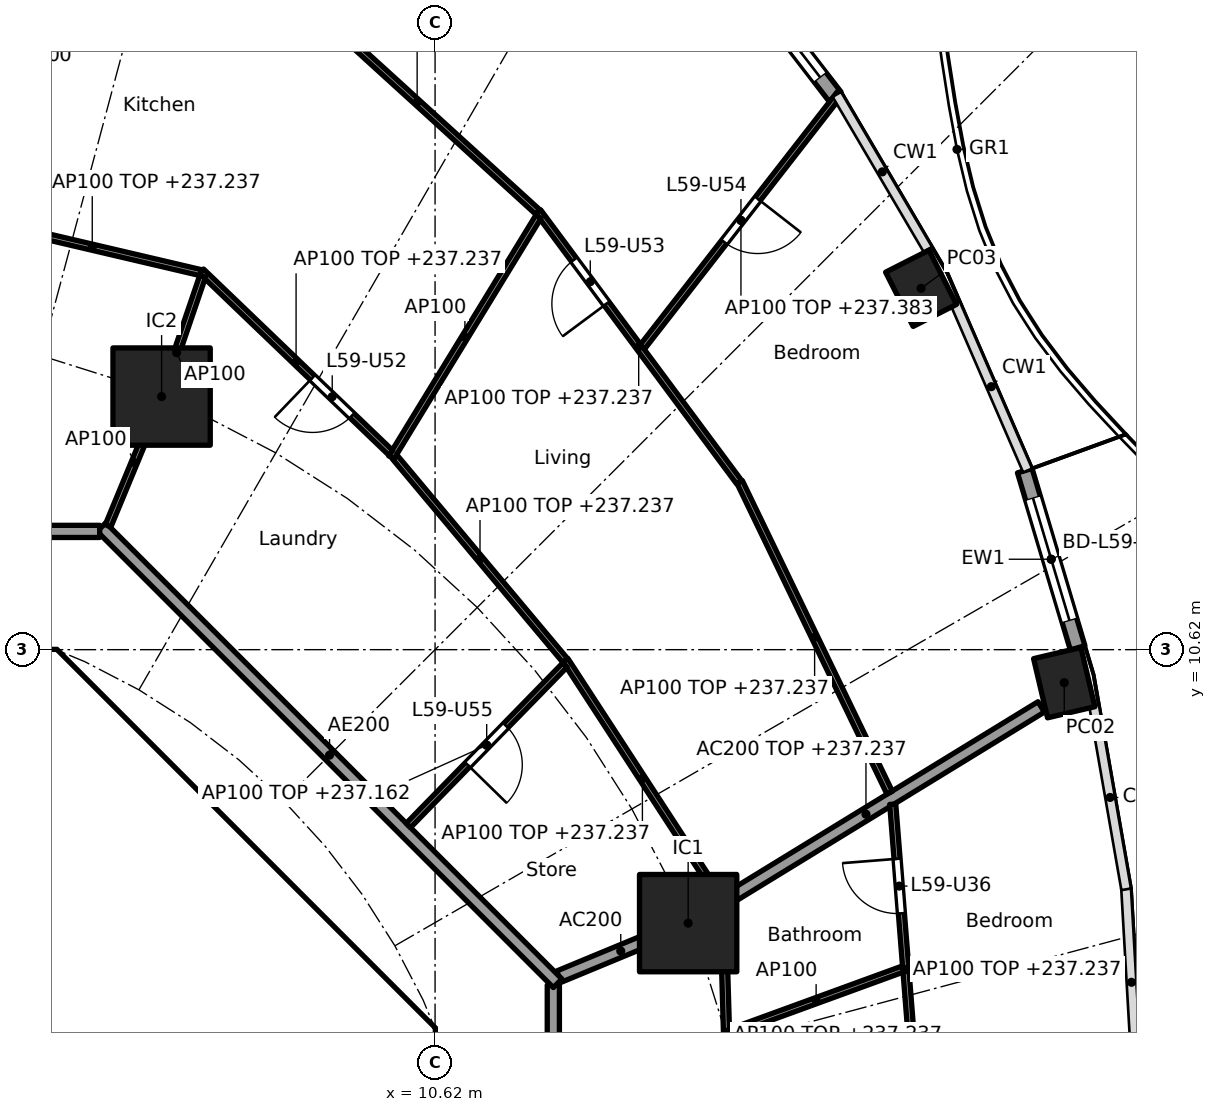
"""IFC4 building model, lengths in metres.
Left out: names, types, materials, properties, quantities, classifications, styles, units other than length and angle.
Written with IfcOpenShell. Run it as: python <this file> out.ifc"""

import sys

from ifc_helpers import new_model, si_unit, direction, frame, frame_2d, origin, origin_2d, place, context, subcontext, project, spatial, polyline, rectangle, hollow_rectangle, outline, extrude, element, fill, save


model = new_model("IFC4")
c1 = context("Model", 3, precision=1e-05, world=origin(), true_north=direction((0.0, 1.0)))
c2 = subcontext(c1, "Body", "Model", "MODEL_VIEW")
j1 = project(units=[si_unit("LENGTHUNIT", "METRE"), si_unit("PLANEANGLEUNIT", "RADIAN")], contexts=[c1])
p1 = place(None, origin())
s1 = spatial("IfcSite", under=j1, at=p1, CompositionType="ELEMENT")
p2 = place(p1, origin())
s2 = spatial("IfcBuilding", under=s1, at=p2, CompositionType="ELEMENT")
p3 = place(p2, frame((0.0, 0.0, 234.4)))
s3 = spatial("IfcBuildingStorey", under=s2, at=p3, CompositionType="ELEMENT", Elevation=234.4)
for number, where, z_axis, x_axis in (
    (1, (20.967, 10.077, 0.0), (0.0, 0.0, 1.0), (-0.229, 0.973, 0.0)),
    (2, (18.612, 16.563, 0.0), (0.0, 0.0, 1.0), (-0.452, 0.892, 0.0)),
):
    element("IfcColumn", number, at=place(p3, frame(where, z_axis=z_axis, x_axis=x_axis)), inside=s3, PredefinedType="COLUMN", context=c2, shape_type="SweptSolid", body=[
        extrude(hollow_rectangle(XDim=1.0, YDim=0.8, WallThickness=0.032, at=origin_2d()), origin(), (0.0, 0.0, 1.0), 3.7),
    ])
for number, where, z_axis, x_axis in (
    (3, (14.782, 6.123, 0.0), (0.0, 0.0, 1.0), (1.0, 0.0, 0.0)),
    (4, (6.123, 14.782, 0.0), (0.0, 0.0, 1.0), (1.0, 0.0, 0.0)),
):
    element("IfcColumn", number, at=place(p3, frame(where, z_axis=z_axis, x_axis=x_axis)), inside=s3, PredefinedType="COLUMN", context=c2, shape_type="SweptSolid", body=[
        extrude(rectangle(XDim=1.6, YDim=1.6, at=origin_2d()), origin(), (0.0, 0.0, 1.0), 3.7),
    ])
p4 = place(p3, frame((20.318, 13.564, 0.0), z_axis=(0.0, 0.0, 1.0), x_axis=(0.285785716255, -0.958293548128, 0.0)))
e5 = element("IfcWall", 5, at=p4, inside=s3, PredefinedType="SOLIDWALL", context=c2, shape_type="SweptSolid", body=[
    extrude(rectangle(XDim=3.04, YDim=0.25, at=frame_2d((1.52, 0.0))), origin(), (0.0, 0.0, 1.0), 3.44),
])
p5 = place(p4, frame((0.47, 0.0, 0.0)))
e6 = element("IfcOpeningElement", 6, at=p5, cuts=e5, PredefinedType="OPENING", context=c2, shape_type="SweptSolid", body=[
    extrude(rectangle(XDim=2.1, YDim=2.4, at=frame_2d((1.05, 1.2))), frame((0.0, 0.135, 0.0), z_axis=(0.0, -1.0, 0.0), x_axis=(1.0, 0.0, 0.0)), (0.0, 0.0, 1.0), 0.27),
])
p6 = place(p3, frame((15.426, 22.013, 0.0), z_axis=(0.0, 0.0, 1.0), x_axis=(0.610438565676, -0.792063607001, 0.0)))
e7 = element("IfcWall", 7, at=p6, inside=s3, PredefinedType="SOLIDWALL", context=c2, shape_type="SweptSolid", body=[
    extrude(rectangle(XDim=2.901, YDim=0.25, at=frame_2d((1.45, 0.0))), origin(), (0.0, 0.0, 1.0), 3.44),
])
p7 = place(p6, frame((0.4, 0.0, 0.0)))
e8 = element("IfcOpeningElement", 8, at=p7, cuts=e7, PredefinedType="OPENING", context=c2, shape_type="SweptSolid", body=[
    extrude(rectangle(XDim=2.1, YDim=2.4, at=frame_2d((1.05, 1.2))), frame((0.0, 0.135, 0.0), z_axis=(0.0, -1.0, 0.0), x_axis=(1.0, 0.0, 0.0)), (0.0, 0.0, 1.0), 0.27),
])
p8 = place(p3, frame((9.988, 4.613, 0.0), z_axis=(0.0, 0.0, 1.0), x_axis=(-0.707106781187, 0.707106781187, 0.0)))
e9 = element("IfcWall", 9, at=p8, inside=s3, PredefinedType="SHEAR", context=c2, shape_type="SweptSolid", body=[
    extrude(rectangle(XDim=7.602, YDim=0.6, at=frame_2d((3.801, 0.0))), origin(), (0.0, 0.0, 1.0), 3.44),
])
p9 = place(p8, frame((3.201, 0.0, 0.0)))
e10 = element("IfcOpeningElement", 10, at=p9, cuts=e9, PredefinedType="OPENING", context=c2, shape_type="SweptSolid", body=[
    extrude(rectangle(XDim=1.2, YDim=2.1, at=frame_2d((0.6, 1.05))), frame((0.0, 0.31, 0.0), z_axis=(0.0, -1.0, 0.0), x_axis=(1.0, 0.0, 0.0)), (0.0, 0.0, 1.0), 0.62),
])
p10 = place(p3, origin())
e11 = element("IfcWall", 11, at=p10, inside=s3, PredefinedType="SHEAR", context=c2, shape_type="SweptSolid", body=[
    extrude(outline(polyline([(-4.152, 10.025), (-4.401, 9.776), (-4.825, 10.2), (-4.401, 10.625), (4.401, 10.625), (4.825, 10.2), (4.401, 9.776), (4.152, 10.025), (-4.152, 10.025)])), origin(), (0.0, 0.0, 1.0), 3.44),
])
p11 = place(p3, origin())
e12 = element("IfcWall", 12, at=p11, inside=s3, PredefinedType="SHEAR", context=c2, shape_type="SweptSolid", body=[
    extrude(outline(polyline([(9.776, -4.401), (10.025, -4.152), (10.025, -3.801), (10.025, 4.152), (9.776, 4.401), (10.2, 4.825), (10.625, 4.401), (10.625, -4.401), (10.2, -4.825), (9.776, -4.401)])), origin(), (0.0, 0.0, 1.0), 3.44),
])
p12 = place(p3, frame((12.657, 5.243, 0.0), z_axis=(0.0, 0.0, 1.0), x_axis=(0.92383017907, 0.382802560388, 0.0)))
e13 = element("IfcWall", 13, at=p12, inside=s3, PredefinedType="PARTITIONING", context=c2, shape_type="SweptSolid", body=[
    extrude(rectangle(XDim=2.2, YDim=0.2, at=frame_2d((1.1, 0.0))), origin(), (0.0, 0.0, 1.0), 3.44),
])
p13 = place(p3, frame((14.825, 6.149, 0.0), z_axis=(0.0, 0.0, 1.0), x_axis=(0.852781365284, 0.522268075824, 0.0)))
e14 = element("IfcWall", 14, at=p13, inside=s3, PredefinedType="PARTITIONING", context=c2, shape_type="SweptSolid", body=[
    extrude(rectangle(XDim=6.758, YDim=0.2, at=frame_2d((3.379, 0.0))), origin(), (0.0, 0.0, 1.0), 2.837),
])
p14 = place(p3, frame((12.565, -5.104, 0.0), z_axis=(0.0, 0.0, 1.0), x_axis=(0.0, 1.0, 0.0)))
e15 = element("IfcWall", 15, at=p14, inside=s3, PredefinedType="PARTITIONING", context=c2, shape_type="SweptSolid", body=[
    extrude(rectangle(XDim=10.209, YDim=0.2, at=frame_2d((5.104, 0.0))), origin(), (0.0, 0.0, 1.0), 3.44),
])
p15 = place(p14, frame((4.604, 0.0, 0.0)))
e16 = element("IfcOpeningElement", 16, at=p15, cuts=e15, PredefinedType="OPENING", context=c2, shape_type="SweptSolid", body=[
    extrude(rectangle(XDim=1.0, YDim=2.1, at=frame_2d((0.5, 1.05))), frame((0.0, 0.11, 0.0), z_axis=(0.0, -1.0, 0.0), x_axis=(1.0, 0.0, 0.0)), (0.0, 0.0, 1.0), 0.22),
])
p16 = place(p3, frame((12.635, 5.134, 0.0), z_axis=(0.0, 0.0, 1.0), x_axis=(-0.707106781187, 0.707106781187, 0.0)))
e17 = element("IfcWall", 17, at=p16, inside=s3, PredefinedType="PARTITIONING", context=c2, shape_type="SweptSolid", body=[
    extrude(rectangle(XDim=10.609, YDim=0.2, at=frame_2d((5.305, 0.0))), origin(), (0.0, 0.0, 1.0), 3.44),
])
p17 = place(p3, frame((5.104, 12.565, 0.0), z_axis=(0.0, 0.0, 1.0), x_axis=(-1.0, 0.0, 0.0)))
e18 = element("IfcWall", 18, at=p17, inside=s3, PredefinedType="PARTITIONING", context=c2, shape_type="SweptSolid", body=[
    extrude(rectangle(XDim=10.409, YDim=0.2, at=frame_2d((5.205, 0.0))), origin(), (0.0, 0.0, 1.0), 3.44),
])
p18 = place(p3, frame((15.475, 2.2, 0.0), z_axis=(0.0, 0.0, 1.0), x_axis=(-0.029254623973, 0.999571991893, 0.0)))
e19 = element("IfcWall", 19, at=p18, inside=s3, PredefinedType="PARTITIONING", context=c2, shape_type="SweptSolid", body=[
    extrude(rectangle(XDim=4.173, YDim=0.1, at=frame_2d((2.086, 0.0))), origin(), (0.0, 0.0, 1.0), 2.837),
])
p19 = place(p3, frame((18.578, 2.642, 0.0), z_axis=(0.0, 0.0, 1.0), x_axis=(-0.079188322924, 0.996859673932, 0.0)))
e20 = element("IfcWall", 20, at=p19, inside=s3, PredefinedType="PARTITIONING", context=c2, shape_type="SweptSolid", body=[
    extrude(rectangle(XDim=5.454, YDim=0.1, at=frame_2d((2.727, 0.0))), origin(), (0.0, 0.0, 1.0), 2.837),
])
p20 = place(p19, frame((3.653, 0.0, 0.0)))
e21 = element("IfcOpeningElement", 21, at=p20, cuts=e20, PredefinedType="OPENING", context=c2, shape_type="SweptSolid", body=[
    extrude(rectangle(XDim=0.9, YDim=2.1, at=frame_2d((0.45, 1.05))), frame((0.0, 0.06, 0.0), z_axis=(0.0, -1.0, 0.0), x_axis=(1.0, 0.0, 0.0)), (0.0, 0.0, 1.0), 0.12),
])
p21 = place(p3, frame((15.46, 4.327, 0.0), z_axis=(0.0, 0.0, 1.0), x_axis=(0.939452643938, 0.342678755977, 0.0)))
e22 = element("IfcWall", 22, at=p21, inside=s3, PredefinedType="PARTITIONING", context=c2, shape_type="SweptSolid", body=[
    extrude(rectangle(XDim=3.037, YDim=0.1, at=frame_2d((1.519, 0.0))), origin(), (0.0, 0.0, 1.0), 3.44),
])
p22 = place(p3, frame((15.295, 6.554, 0.0), z_axis=(0.0, 0.0, 1.0), x_axis=(-0.545186120363, 0.838315032767, 0.0)))
e23 = element("IfcWall", 23, at=p22, inside=s3, PredefinedType="PARTITIONING", context=c2, shape_type="SweptSolid", body=[
    extrude(rectangle(XDim=4.643, YDim=0.1, at=frame_2d((2.321, 0.0))), origin(), (0.0, 0.0, 1.0), 2.837),
])
p23 = place(p3, frame((18.095, 8.269, 0.0), z_axis=(0.0, 0.0, 1.0), x_axis=(-0.434640773561, 0.900603907363, 0.0)))
e24 = element("IfcWall", 24, at=p23, inside=s3, PredefinedType="PARTITIONING", context=c2, shape_type="SweptSolid", body=[
    extrude(rectangle(XDim=5.674, YDim=0.1, at=frame_2d((2.837, 0.0))), origin(), (0.0, 0.0, 1.0), 2.837),
])
p24 = place(p3, frame((10.181, 7.729, 0.0), z_axis=(0.0, 0.0, 1.0), x_axis=(0.69841402561, 0.71569396311, 0.0)))
e25 = element("IfcWall", 25, at=p24, inside=s3, PredefinedType="PARTITIONING", context=c2, shape_type="SweptSolid", body=[
    extrude(rectangle(XDim=3.688, YDim=0.1, at=frame_2d((1.844, 0.0))), origin(), (0.0, 0.0, 1.0), 2.762),
])
p25 = place(p24, frame((1.394, 0.0, 0.0)))
e26 = element("IfcOpeningElement", 26, at=p25, cuts=e25, PredefinedType="OPENING", context=c2, shape_type="SweptSolid", body=[
    extrude(rectangle(XDim=0.9, YDim=2.1, at=frame_2d((0.45, 1.05))), frame((0.0, 0.06, 0.0), z_axis=(0.0, -1.0, 0.0), x_axis=(1.0, 0.0, 0.0)), (0.0, 0.0, 1.0), 0.12),
])
p26 = place(p3, frame((12.759, 10.443, 0.0), z_axis=(0.0, 0.0, 1.0), x_axis=(-0.642225196965, 0.766516011825, 0.0)))
e27 = element("IfcWall", 27, at=p26, inside=s3, PredefinedType="PARTITIONING", context=c2, shape_type="SweptSolid", body=[
    extrude(rectangle(XDim=4.361, YDim=0.1, at=frame_2d((2.18, 0.0))), origin(), (0.0, 0.0, 1.0), 2.837),
])
p27 = place(p3, frame((15.621, 13.374, 0.0), z_axis=(0.0, 0.0, 1.0), x_axis=(-0.596165830899, 0.802861321816, 0.0)))
e28 = element("IfcWall", 28, at=p27, inside=s3, PredefinedType="PARTITIONING", context=c2, shape_type="SweptSolid", body=[
    extrude(rectangle(XDim=5.542, YDim=0.1, at=frame_2d((2.771, 0.0))), origin(), (0.0, 0.0, 1.0), 2.837),
])
p28 = place(p27, frame((3.656, 0.0, 0.0)))
e29 = element("IfcOpeningElement", 29, at=p28, cuts=e28, PredefinedType="OPENING", context=c2, shape_type="SweptSolid", body=[
    extrude(rectangle(XDim=0.9, YDim=2.1, at=frame_2d((0.45, 1.05))), frame((0.0, 0.06, 0.0), z_axis=(0.0, -1.0, 0.0), x_axis=(1.0, 0.0, 0.0)), (0.0, 0.0, 1.0), 0.12),
])
p29 = place(p3, frame((14.029, 15.598, 0.0), z_axis=(0.0, 0.0, 1.0), x_axis=(0.614558710688, 0.788871086501, 0.0)))
e30 = element("IfcWall", 30, at=p29, inside=s3, PredefinedType="PARTITIONING", context=c2, shape_type="SweptSolid", body=[
    extrude(rectangle(XDim=5.276, YDim=0.1, at=frame_2d((2.638, 0.0))), origin(), (0.0, 0.0, 1.0), 2.983),
])
p30 = place(p29, frame((2.188, 0.0, 0.0)))
e31 = element("IfcOpeningElement", 31, at=p30, cuts=e30, PredefinedType="OPENING", context=c2, shape_type="SweptSolid", body=[
    extrude(rectangle(XDim=0.9, YDim=2.1, at=frame_2d((0.45, 1.05))), frame((0.0, 0.06, 0.0), z_axis=(0.0, -1.0, 0.0), x_axis=(1.0, 0.0, 0.0)), (0.0, 0.0, 1.0), 0.12),
])
p31 = place(p3, frame((9.9, 13.781, 0.0), z_axis=(0.0, 0.0, 1.0), x_axis=(0.521464905534, 0.853272730313, 0.0)))
e32 = element("IfcWall", 32, at=p31, inside=s3, PredefinedType="PARTITIONING", context=c2, shape_type="SweptSolid", body=[
    extrude(rectangle(XDim=4.641, YDim=0.1, at=frame_2d((2.32, 0.0))), origin(), (0.0, 0.0, 1.0), 3.44),
])
p32 = place(p3, frame((9.89, 13.858, 0.0), z_axis=(0.0, 0.0, 1.0), x_axis=(-0.72167233993, 0.692234811159, 0.0)))
e33 = element("IfcWall", 33, at=p32, inside=s3, PredefinedType="PARTITIONING", context=c2, shape_type="SweptSolid", body=[
    extrude(rectangle(XDim=4.313, YDim=0.1, at=frame_2d((2.156, 0.0))), origin(), (0.0, 0.0, 1.0), 2.837),
])
p33 = place(p32, frame((0.883, 0.0, 0.0)))
e34 = element("IfcOpeningElement", 34, at=p33, cuts=e33, PredefinedType="OPENING", context=c2, shape_type="SweptSolid", body=[
    extrude(rectangle(XDim=0.9, YDim=2.1, at=frame_2d((0.45, 1.05))), frame((0.0, 0.06, 0.0), z_axis=(0.0, -1.0, 0.0), x_axis=(1.0, 0.0, 0.0)), (0.0, 0.0, 1.0), 0.12),
])
p34 = place(p3, frame((12.31, 17.817, 0.0), z_axis=(0.0, 0.0, 1.0), x_axis=(-0.739697052892, 0.672940019573, 0.0)))
e35 = element("IfcWall", 35, at=p34, inside=s3, PredefinedType="PARTITIONING", context=c2, shape_type="SweptSolid", body=[
    extrude(rectangle(XDim=5.365, YDim=0.1, at=frame_2d((2.683, 0.0))), origin(), (0.0, 0.0, 1.0), 2.837),
])
p35 = place(p3, frame((5.243, 12.657, 0.0), z_axis=(0.0, 0.0, 1.0), x_axis=(0.382719158442, 0.923864733477, 0.0)))
e36 = element("IfcWall", 36, at=p35, inside=s3, PredefinedType="PARTITIONING", context=c2, shape_type="SweptSolid", body=[
    extrude(rectangle(XDim=2.25, YDim=0.1, at=frame_2d((1.125, 0.0))), origin(), (0.0, 0.0, 1.0), 3.44),
])
p36 = place(p3, frame((6.139, 14.829, 0.0), z_axis=(0.0, 0.0, 1.0), x_axis=(0.32278593828, 0.946471995385, 0.0)))
e37 = element("IfcWall", 37, at=p36, inside=s3, PredefinedType="PARTITIONING", context=c2, shape_type="SweptSolid", body=[
    extrude(rectangle(XDim=2.042, YDim=0.1, at=frame_2d((1.021, 0.0))), origin(), (0.0, 0.0, 1.0), 3.44),
])
p37 = place(p3, frame((6.766, 16.82, 0.0), z_axis=(0.0, 0.0, 1.0), x_axis=(-0.973612608559, 0.22820711745, 0.0)))
e38 = element("IfcWall", 38, at=p37, inside=s3, PredefinedType="PARTITIONING", context=c2, shape_type="SweptSolid", body=[
    extrude(rectangle(XDim=3.663, YDim=0.1, at=frame_2d((1.832, 0.0))), origin(), (0.0, 0.0, 1.0), 2.837),
])
p38 = place(p5, origin())
e39 = element("IfcDoor", 39, at=p38, inside=s3, OperationType="SLIDING_TO_LEFT", PredefinedType="DOOR", context=c2, shape_type="SweptSolid", body=[
    extrude(rectangle(XDim=2.1, YDim=2.4, at=frame_2d((1.05, 1.2))), frame((0.0, 0.025, 0.0), z_axis=(0.0, -1.0, 0.0), x_axis=(1.0, 0.0, 0.0)), (0.0, 0.0, 1.0), 0.05),
])
fill(e6, e39)
p39 = place(p7, origin())
e40 = element("IfcDoor", 40, at=p39, inside=s3, OperationType="SLIDING_TO_LEFT", PredefinedType="DOOR", context=c2, shape_type="SweptSolid", body=[
    extrude(rectangle(XDim=2.1, YDim=2.4, at=frame_2d((1.05, 1.2))), frame((0.0, 0.025, 0.0), z_axis=(0.0, -1.0, 0.0), x_axis=(1.0, 0.0, 0.0)), (0.0, 0.0, 1.0), 0.05),
])
fill(e8, e40)
p40 = place(p9, origin())
e41 = element("IfcDoor", 41, at=p40, inside=s3, OperationType="SINGLE_SWING_LEFT", PredefinedType="DOOR", context=c2, shape_type="SweptSolid", body=[
    extrude(rectangle(XDim=1.2, YDim=2.1, at=frame_2d((0.6, 1.05))), frame((0.0, 0.025, 0.0), z_axis=(0.0, -1.0, 0.0), x_axis=(1.0, 0.0, 0.0)), (0.0, 0.0, 1.0), 0.05),
])
fill(e10, e41)
p41 = place(p20, origin())
e42 = element("IfcDoor", 42, at=p41, inside=s3, OperationType="SINGLE_SWING_RIGHT", PredefinedType="DOOR", context=c2, shape_type="SweptSolid", body=[
    extrude(rectangle(XDim=0.9, YDim=2.1, at=frame_2d((0.45, 1.05))), frame((0.0, 0.025, 0.0), z_axis=(0.0, -1.0, 0.0), x_axis=(1.0, 0.0, 0.0)), (0.0, 0.0, 1.0), 0.05),
])
fill(e21, e42)
p42 = place(p33, origin())
e43 = element("IfcDoor", 43, at=p42, inside=s3, OperationType="SINGLE_SWING_RIGHT", PredefinedType="DOOR", context=c2, shape_type="SweptSolid", body=[
    extrude(rectangle(XDim=0.9, YDim=2.1, at=frame_2d((0.45, 1.05))), frame((0.0, 0.025, 0.0), z_axis=(0.0, -1.0, 0.0), x_axis=(1.0, 0.0, 0.0)), (0.0, 0.0, 1.0), 0.05),
])
fill(e34, e43)
p43 = place(p28, origin())
e44 = element("IfcDoor", 44, at=p43, inside=s3, OperationType="SINGLE_SWING_LEFT", PredefinedType="DOOR", context=c2, shape_type="SweptSolid", body=[
    extrude(rectangle(XDim=0.9, YDim=2.1, at=frame_2d((0.45, 1.05))), frame((0.0, 0.025, 0.0), z_axis=(0.0, -1.0, 0.0), x_axis=(1.0, 0.0, 0.0)), (0.0, 0.0, 1.0), 0.05),
])
fill(e29, e44)
p44 = place(p30, frame((0.9, 0.0, 0.0), x_axis=(-1.0, 0.0, 0.0)))
e45 = element("IfcDoor", 45, at=p44, inside=s3, OperationType="SINGLE_SWING_LEFT", PredefinedType="DOOR", context=c2, shape_type="SweptSolid", body=[
    extrude(rectangle(XDim=0.9, YDim=2.1, at=frame_2d((0.45, 1.05))), frame((0.0, 0.025, 0.0), z_axis=(0.0, -1.0, 0.0), x_axis=(1.0, 0.0, 0.0)), (0.0, 0.0, 1.0), 0.05),
])
fill(e31, e45)
p45 = place(p25, frame((0.9, 0.0, 0.0), x_axis=(-1.0, 0.0, 0.0)))
e46 = element("IfcDoor", 46, at=p45, inside=s3, OperationType="SINGLE_SWING_RIGHT", PredefinedType="DOOR", context=c2, shape_type="SweptSolid", body=[
    extrude(rectangle(XDim=0.9, YDim=2.1, at=frame_2d((0.45, 1.05))), frame((0.0, 0.025, 0.0), z_axis=(0.0, -1.0, 0.0), x_axis=(1.0, 0.0, 0.0)), (0.0, 0.0, 1.0), 0.05),
])
fill(e26, e46)
save(model, sys.argv[1])
